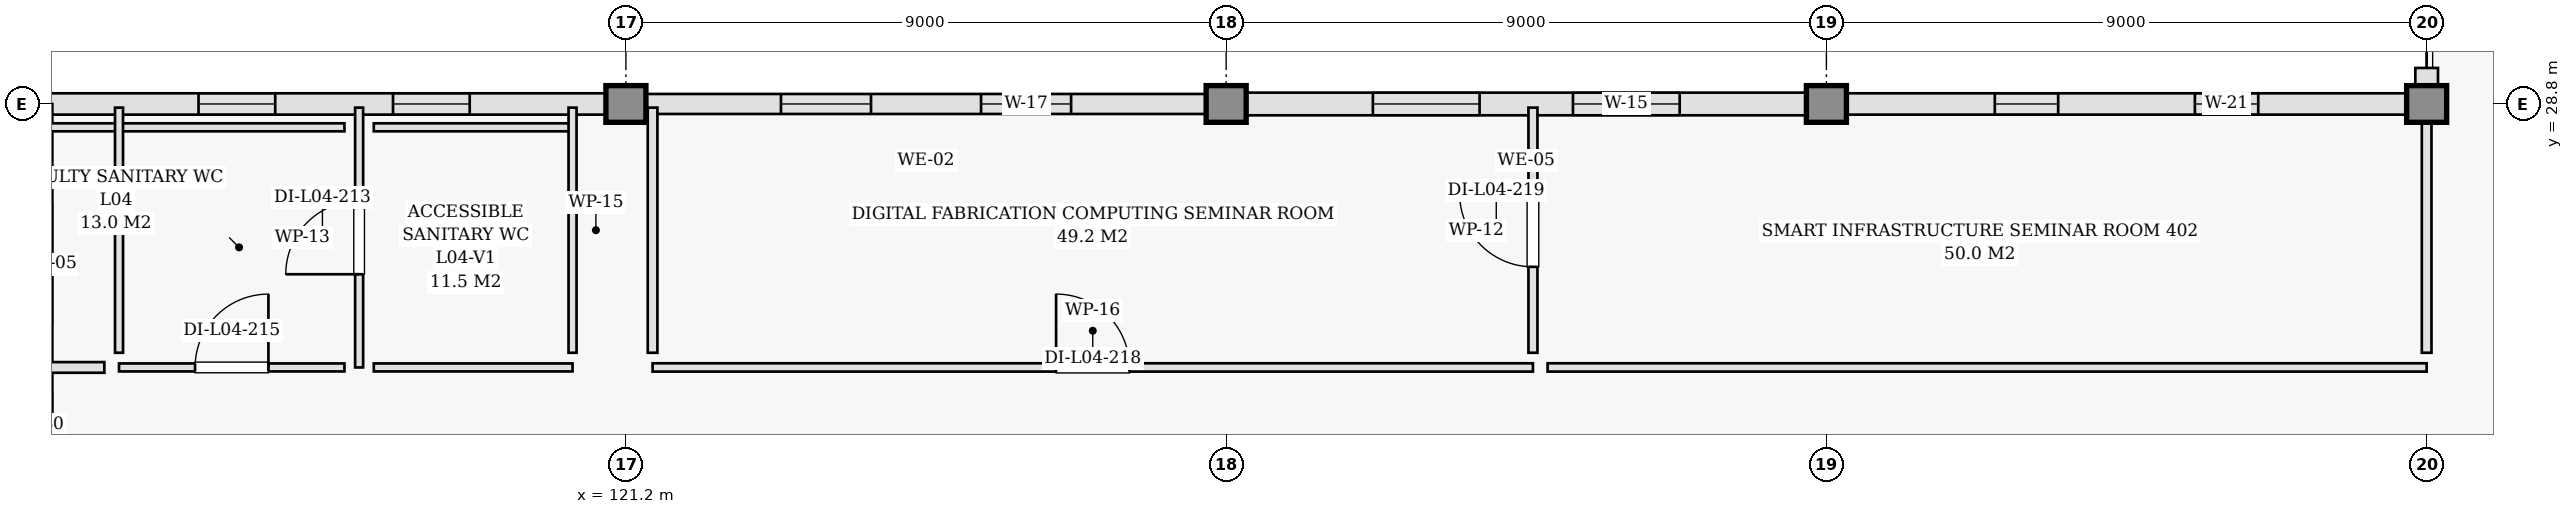
"""IFC4 building model, lengths in metres.
Left out: names, types, materials, properties, quantities, classifications, styles, units other than length and angle.
Written with IfcOpenShell. Run it as: python <this file> out.ifc"""

import sys

from ifc_helpers import new_model, si_unit, direction, frame, frame_2d, origin, origin_2d, place, context, subcontext, project, spatial, rectangle, extrude, element, fill, save


model = new_model("IFC4")
c1 = context("Model", 3, precision=1e-05, world=origin(), true_north=direction((0.0, 1.0)))
c2 = subcontext(c1, "Body", "Model", "MODEL_VIEW")
j1 = project(units=[si_unit("LENGTHUNIT", "METRE"), si_unit("PLANEANGLEUNIT", "RADIAN")], contexts=[c1])
p1 = place(None, origin())
s1 = spatial("IfcSite", under=j1, at=p1, CompositionType="ELEMENT")
p2 = place(p1, origin())
s2 = spatial("IfcBuilding", under=s1, at=p2, CompositionType="ELEMENT")
p3 = place(p2, frame((0.0, 0.0, 18.0)))
s3 = spatial("IfcBuildingStorey", under=s2, at=p3, CompositionType="ELEMENT", Elevation=18.0)
for number, where, z_axis, x_axis in (
    (1, (121.2, 28.8, 0.0), (0.0, 0.0, 1.0), (1.0, 0.0, 0.0)),
    (2, (130.2, 28.8, 0.0), (0.0, 0.0, 1.0), (1.0, 0.0, 0.0)),
    (3, (139.2, 28.8, 0.0), (0.0, 0.0, 1.0), (1.0, 0.0, 0.0)),
    (4, (148.2, 28.8, 0.0), (0.0, 0.0, 1.0), (1.0, 0.0, 0.0)),
):
    element("IfcColumn", number, at=place(p3, frame(where, z_axis=z_axis, x_axis=x_axis)), inside=s3, PredefinedType="COLUMN", context=c2, shape_type="SweptSolid", body=[
        extrude(rectangle(XDim=0.55, YDim=0.55, at=origin_2d()), origin(), (0.0, 0.0, 1.0), 4.2),
    ])
p4 = place(p3, frame((148.2, 29.34, 0.0), z_axis=(0.0, 0.0, 1.0), x_axis=(0.0, -1.0, 0.0)))
e5 = element("IfcWall", 5, at=p4, inside=s3, PredefinedType="SOLIDWALL", context=c2, shape_type="SweptSolid", body=[
    extrude(rectangle(XDim=0.378, YDim=0.34, at=frame_2d((0.189, 0.0))), origin(), (0.0, 0.0, 1.0), 3.125),
])
p5 = place(p3, frame((148.2, 28.8, 0.0), z_axis=(0.0, 0.0, 1.0), x_axis=(-1.0, 0.0, 0.0)))
e6 = element("IfcWall", 6, at=p5, inside=s3, PredefinedType="SOLIDWALL", context=c2, shape_type="SweptSolid", body=[
    extrude(rectangle(XDim=9.0, YDim=0.32, at=frame_2d((4.5, 0.0))), origin(), (0.0, 0.0, 1.0), 3.125),
])
p6 = place(p5, frame((2.525, 0.0, 0.9)))
e7 = element("IfcOpeningElement", 7, at=p6, cuts=e6, PredefinedType="OPENING", context=c2, shape_type="SweptSolid", body=[
    extrude(rectangle(XDim=0.95, YDim=1.35, at=frame_2d((0.475, 0.675))), frame((0.0, 0.17, 0.0), z_axis=(0.0, -1.0, 0.0), x_axis=(1.0, 0.0, 0.0)), (0.0, 0.0, 1.0), 0.34),
])
p7 = place(p5, frame((5.525, 0.0, 0.9)))
e8 = element("IfcOpeningElement", 8, at=p7, cuts=e6, PredefinedType="OPENING", context=c2, shape_type="SweptSolid", body=[
    extrude(rectangle(XDim=0.95, YDim=1.35, at=frame_2d((0.475, 0.675))), frame((0.0, 0.17, 0.0), z_axis=(0.0, -1.0, 0.0), x_axis=(1.0, 0.0, 0.0)), (0.0, 0.0, 1.0), 0.34),
])
p8 = place(p3, frame((139.2, 28.8, 0.0), z_axis=(0.0, 0.0, 1.0), x_axis=(-1.0, 0.0, 0.0)))
e9 = element("IfcWall", 9, at=p8, inside=s3, PredefinedType="SOLIDWALL", context=c2, shape_type="SweptSolid", body=[
    extrude(rectangle(XDim=9.0, YDim=0.34, at=frame_2d((4.5, 0.0))), origin(), (0.0, 0.0, 1.0), 3.125),
])
p9 = place(p8, frame((2.2, 0.0, 0.9)))
e10 = element("IfcOpeningElement", 10, at=p9, cuts=e9, PredefinedType="OPENING", context=c2, shape_type="SweptSolid", body=[
    extrude(rectangle(XDim=1.6, YDim=1.6, at=frame_2d((0.8, 0.8))), frame((0.0, 0.18, 0.0), z_axis=(0.0, -1.0, 0.0), x_axis=(1.0, 0.0, 0.0)), (0.0, 0.0, 1.0), 0.36),
])
p10 = place(p8, frame((5.2, 0.0, 0.9)))
e11 = element("IfcOpeningElement", 11, at=p10, cuts=e9, PredefinedType="OPENING", context=c2, shape_type="SweptSolid", body=[
    extrude(rectangle(XDim=1.6, YDim=1.6, at=frame_2d((0.8, 0.8))), frame((0.0, 0.18, 0.0), z_axis=(0.0, -1.0, 0.0), x_axis=(1.0, 0.0, 0.0)), (0.0, 0.0, 1.0), 0.36),
])
p11 = place(p3, frame((130.2, 28.8, 0.0), z_axis=(0.0, 0.0, 1.0), x_axis=(-1.0, 0.0, 0.0)))
e12 = element("IfcWall", 12, at=p11, inside=s3, PredefinedType="SOLIDWALL", context=c2, shape_type="SweptSolid", body=[
    extrude(rectangle(XDim=9.0, YDim=0.3, at=frame_2d((4.5, 0.0))), origin(), (0.0, 0.0, 1.0), 3.125),
])
p12 = place(p11, frame((2.325, 0.0, 0.9)))
e13 = element("IfcOpeningElement", 13, at=p12, cuts=e12, PredefinedType="OPENING", context=c2, shape_type="SweptSolid", body=[
    extrude(rectangle(XDim=1.35, YDim=1.55, at=frame_2d((0.675, 0.775))), frame((0.0, 0.16, 0.0), z_axis=(0.0, -1.0, 0.0), x_axis=(1.0, 0.0, 0.0)), (0.0, 0.0, 1.0), 0.32),
])
p13 = place(p11, frame((5.325, 0.0, 0.9)))
e14 = element("IfcOpeningElement", 14, at=p13, cuts=e12, PredefinedType="OPENING", context=c2, shape_type="SweptSolid", body=[
    extrude(rectangle(XDim=1.35, YDim=1.55, at=frame_2d((0.675, 0.775))), frame((0.0, 0.16, 0.0), z_axis=(0.0, -1.0, 0.0), x_axis=(1.0, 0.0, 0.0)), (0.0, 0.0, 1.0), 0.32),
])
p14 = place(p3, frame((121.2, 28.8, 0.0), z_axis=(0.0, 0.0, 1.0), x_axis=(-1.0, 0.0, 0.0)))
e15 = element("IfcWall", 15, at=p14, inside=s3, PredefinedType="SOLIDWALL", context=c2, shape_type="SweptSolid", body=[
    extrude(rectangle(XDim=8.75, YDim=0.32, at=frame_2d((4.375, 0.0))), origin(), (0.0, 0.0, 1.0), 3.125),
])
p15 = place(p14, frame((2.342, 0.0, 0.9)))
e16 = element("IfcOpeningElement", 16, at=p15, cuts=e15, PredefinedType="OPENING", context=c2, shape_type="SweptSolid", body=[
    extrude(rectangle(XDim=1.15, YDim=1.45, at=frame_2d((0.575, 0.725))), frame((0.0, 0.17, 0.0), z_axis=(0.0, -1.0, 0.0), x_axis=(1.0, 0.0, 0.0)), (0.0, 0.0, 1.0), 0.34),
])
p16 = place(p14, frame((5.258, 0.0, 0.9)))
e17 = element("IfcOpeningElement", 17, at=p16, cuts=e15, PredefinedType="OPENING", context=c2, shape_type="SweptSolid", body=[
    extrude(rectangle(XDim=1.15, YDim=1.45, at=frame_2d((0.575, 0.725))), frame((0.0, 0.17, 0.0), z_axis=(0.0, -1.0, 0.0), x_axis=(1.0, 0.0, 0.0)), (0.0, 0.0, 1.0), 0.34),
])
p17 = place(p3, frame((117.2, 24.85, 0.0), z_axis=(0.0, 0.0, 1.0), x_axis=(0.0, 1.0, 0.0)))
e18 = element("IfcWall", 18, at=p17, inside=s3, PredefinedType="PARTITIONING", context=c2, shape_type="SweptSolid", body=[
    extrude(rectangle(XDim=3.895, YDim=0.12, at=frame_2d((1.948, 0.0))), origin(), (0.0, 0.0, 1.0), 3.125),
])
p18 = place(p17, frame((1.397, 0.0, 0.0)))
e19 = element("IfcOpeningElement", 19, at=p18, cuts=e18, PredefinedType="OPENING", context=c2, shape_type="SweptSolid", body=[
    extrude(rectangle(XDim=1.1, YDim=2.15, at=frame_2d((0.55, 1.075))), frame((0.0, 0.07, 0.0), z_axis=(0.0, -1.0, 0.0), x_axis=(1.0, 0.0, 0.0)), (0.0, 0.0, 1.0), 0.14),
])
for number, where, z_axis, x_axis in (
    (20, (117.42, 24.85, 0.0), (0.0, 0.0, 1.0), (1.0, 0.0, 0.0)),
    (21, (117.42, 28.45, 0.0), (0.0, 0.0, 1.0), (1.0, 0.0, 0.0)),
):
    element("IfcWall", number, at=place(p3, frame(where, z_axis=z_axis, x_axis=x_axis)), inside=s3, PredefinedType="PARTITIONING", context=c2, shape_type="SweptSolid", body=[
        extrude(rectangle(XDim=2.98, YDim=0.12, at=frame_2d((1.49, 0.0))), origin(), (0.0, 0.0, 1.0), 3.94),
    ])
p19 = place(p3, frame((120.4, 25.07, 0.0), z_axis=(0.0, 0.0, 1.0), x_axis=(0.0, 1.0, 0.0)))
e22 = element("IfcWall", 22, at=p19, inside=s3, PredefinedType="PARTITIONING", context=c2, shape_type="SweptSolid", body=[
    extrude(rectangle(XDim=3.675, YDim=0.12, at=frame_2d((1.837, 0.0))), origin(), (0.0, 0.0, 1.0), 3.125),
])
p20 = place(p3, frame((112.505, 28.45, 0.0), z_axis=(0.0, 0.0, 1.0), x_axis=(1.0, 0.0, 0.0)))
e23 = element("IfcWall", 23, at=p20, inside=s3, PredefinedType="PARTITIONING", context=c2, shape_type="SweptSolid", body=[
    extrude(rectangle(XDim=4.475, YDim=0.12, at=frame_2d((2.238, 0.0))), origin(), (0.0, 0.0, 1.0), 3.94),
])
p21 = place(p3, frame((113.6, 24.85, 0.0), z_axis=(0.0, 0.0, 1.0), x_axis=(1.0, 0.0, 0.0)))
e24 = element("IfcWall", 24, at=p21, inside=s3, PredefinedType="PARTITIONING", context=c2, shape_type="SweptSolid", body=[
    extrude(rectangle(XDim=3.38, YDim=0.12, at=frame_2d((1.69, 0.0))), origin(), (0.0, 0.0, 1.0), 3.94),
])
p22 = place(p21, frame((1.14, 0.0, 0.0)))
e25 = element("IfcOpeningElement", 25, at=p22, cuts=e24, PredefinedType="OPENING", context=c2, shape_type="SweptSolid", body=[
    extrude(rectangle(XDim=1.1, YDim=2.15, at=frame_2d((0.55, 1.075))), frame((0.0, 0.07, 0.0), z_axis=(0.0, -1.0, 0.0), x_axis=(1.0, 0.0, 0.0)), (0.0, 0.0, 1.0), 0.14),
])
p23 = place(p3, frame((113.6, 25.07, 0.0), z_axis=(0.0, 0.0, 1.0), x_axis=(0.0, 1.0, 0.0)))
e26 = element("IfcWall", 26, at=p23, inside=s3, PredefinedType="PARTITIONING", context=c2, shape_type="SweptSolid", body=[
    extrude(rectangle(XDim=3.675, YDim=0.12, at=frame_2d((1.837, 0.0))), origin(), (0.0, 0.0, 1.0), 3.125),
])
p24 = place(p3, frame((121.6, 24.85, 0.0), z_axis=(0.0, 0.0, 1.0), x_axis=(1.0, 0.0, 0.0)))
e27 = element("IfcWall", 27, at=p24, inside=s3, PredefinedType="PARTITIONING", context=c2, shape_type="SweptSolid", body=[
    extrude(rectangle(XDim=13.2, YDim=0.125, at=frame_2d((6.6, 0.0))), origin(), (0.0, 0.0, 1.0), 3.94),
])
p25 = place(p24, frame((6.05, 0.0, 0.0)))
e28 = element("IfcOpeningElement", 28, at=p25, cuts=e27, PredefinedType="OPENING", context=c2, shape_type="SweptSolid", body=[
    extrude(rectangle(XDim=1.1, YDim=2.15, at=frame_2d((0.55, 1.075))), frame((0.0, 0.073, 0.0), z_axis=(0.0, -1.0, 0.0), x_axis=(1.0, 0.0, 0.0)), (0.0, 0.0, 1.0), 0.145),
])
p26 = place(p3, frame((121.6, 25.07, 0.0), z_axis=(0.0, 0.0, 1.0), x_axis=(0.0, 1.0, 0.0)))
e29 = element("IfcWall", 29, at=p26, inside=s3, PredefinedType="PARTITIONING", context=c2, shape_type="SweptSolid", body=[
    extrude(rectangle(XDim=3.675, YDim=0.145, at=frame_2d((1.837, 0.0))), origin(), (0.0, 0.0, 1.0), 3.125),
])
p27 = place(p3, frame((134.8, 25.07, 0.0), z_axis=(0.0, 0.0, 1.0), x_axis=(0.0, 1.0, 0.0)))
e30 = element("IfcWall", 30, at=p27, inside=s3, PredefinedType="PARTITIONING", context=c2, shape_type="SweptSolid", body=[
    extrude(rectangle(XDim=3.675, YDim=0.135, at=frame_2d((1.837, 0.0))), origin(), (0.0, 0.0, 1.0), 3.125),
])
p28 = place(p27, frame((1.288, 0.0, 0.0)))
e31 = element("IfcOpeningElement", 31, at=p28, cuts=e30, PredefinedType="OPENING", context=c2, shape_type="SweptSolid", body=[
    extrude(rectangle(XDim=1.1, YDim=2.15, at=frame_2d((0.55, 1.075))), frame((0.0, 0.078, 0.0), z_axis=(0.0, -1.0, 0.0), x_axis=(1.0, 0.0, 0.0)), (0.0, 0.0, 1.0), 0.155),
])
p29 = place(p3, frame((135.02, 24.85, 0.0), z_axis=(0.0, 0.0, 1.0), x_axis=(1.0, 0.0, 0.0)))
e32 = element("IfcWall", 32, at=p29, inside=s3, PredefinedType="PARTITIONING", context=c2, shape_type="SweptSolid", body=[
    extrude(rectangle(XDim=13.18, YDim=0.125, at=frame_2d((6.59, 0.0))), origin(), (0.0, 0.0, 1.0), 3.275),
])
p30 = place(p3, frame((148.2, 25.07, 0.0), z_axis=(0.0, 0.0, 1.0), x_axis=(0.0, 1.0, 0.0)))
e33 = element("IfcWall", 33, at=p30, inside=s3, PredefinedType="PARTITIONING", context=c2, shape_type="SweptSolid", body=[
    extrude(rectangle(XDim=3.49, YDim=0.145, at=frame_2d((1.745, 0.0))), origin(), (0.0, 0.0, 1.0), 3.275),
])
p31 = place(p3, frame((112.505, 24.85, 0.0), z_axis=(0.0, 0.0, 1.0), x_axis=(1.0, 0.0, 0.0)))
e34 = element("IfcWall", 34, at=p31, inside=s3, PredefinedType="PARTITIONING", context=c2, shape_type="SweptSolid", body=[
    extrude(rectangle(XDim=0.875, YDim=0.16, at=frame_2d((0.438, 0.0))), origin(), (0.0, 0.0, 1.0), 3.94),
])
p32 = place(p6, origin())
e35 = element("IfcWindow", 35, at=p32, inside=s3, PartitioningType="DOUBLE_PANEL_VERTICAL", PredefinedType="WINDOW", context=c2, shape_type="SweptSolid", body=[
    extrude(rectangle(XDim=0.95, YDim=1.35, at=frame_2d((0.475, 0.675))), frame((0.0, 0.03, 0.0), z_axis=(0.0, -1.0, 0.0), x_axis=(1.0, 0.0, 0.0)), (0.0, 0.0, 1.0), 0.06),
])
fill(e7, e35)
p33 = place(p7, origin())
e36 = element("IfcWindow", 36, at=p33, inside=s3, PartitioningType="DOUBLE_PANEL_VERTICAL", PredefinedType="WINDOW", context=c2, shape_type="SweptSolid", body=[
    extrude(rectangle(XDim=0.95, YDim=1.35, at=frame_2d((0.475, 0.675))), frame((0.0, 0.03, 0.0), z_axis=(0.0, -1.0, 0.0), x_axis=(1.0, 0.0, 0.0)), (0.0, 0.0, 1.0), 0.06),
])
fill(e8, e36)
p34 = place(p9, origin())
e37 = element("IfcWindow", 37, at=p34, inside=s3, PartitioningType="DOUBLE_PANEL_VERTICAL", PredefinedType="WINDOW", context=c2, shape_type="SweptSolid", body=[
    extrude(rectangle(XDim=1.6, YDim=1.6, at=frame_2d((0.8, 0.8))), frame((0.0, 0.03, 0.0), z_axis=(0.0, -1.0, 0.0), x_axis=(1.0, 0.0, 0.0)), (0.0, 0.0, 1.0), 0.06),
])
fill(e10, e37)
p35 = place(p10, origin())
e38 = element("IfcWindow", 38, at=p35, inside=s3, PartitioningType="DOUBLE_PANEL_VERTICAL", PredefinedType="WINDOW", context=c2, shape_type="SweptSolid", body=[
    extrude(rectangle(XDim=1.6, YDim=1.6, at=frame_2d((0.8, 0.8))), frame((0.0, 0.03, 0.0), z_axis=(0.0, -1.0, 0.0), x_axis=(1.0, 0.0, 0.0)), (0.0, 0.0, 1.0), 0.06),
])
fill(e11, e38)
p36 = place(p12, origin())
e39 = element("IfcWindow", 39, at=p36, inside=s3, PartitioningType="DOUBLE_PANEL_VERTICAL", PredefinedType="WINDOW", context=c2, shape_type="SweptSolid", body=[
    extrude(rectangle(XDim=1.35, YDim=1.55, at=frame_2d((0.675, 0.775))), frame((0.0, 0.03, 0.0), z_axis=(0.0, -1.0, 0.0), x_axis=(1.0, 0.0, 0.0)), (0.0, 0.0, 1.0), 0.06),
])
fill(e13, e39)
p37 = place(p13, origin())
e40 = element("IfcWindow", 40, at=p37, inside=s3, PartitioningType="DOUBLE_PANEL_VERTICAL", PredefinedType="WINDOW", context=c2, shape_type="SweptSolid", body=[
    extrude(rectangle(XDim=1.35, YDim=1.55, at=frame_2d((0.675, 0.775))), frame((0.0, 0.03, 0.0), z_axis=(0.0, -1.0, 0.0), x_axis=(1.0, 0.0, 0.0)), (0.0, 0.0, 1.0), 0.06),
])
fill(e14, e40)
p38 = place(p15, origin())
e41 = element("IfcWindow", 41, at=p38, inside=s3, PartitioningType="DOUBLE_PANEL_VERTICAL", PredefinedType="WINDOW", context=c2, shape_type="SweptSolid", body=[
    extrude(rectangle(XDim=1.15, YDim=1.45, at=frame_2d((0.575, 0.725))), frame((0.0, 0.03, 0.0), z_axis=(0.0, -1.0, 0.0), x_axis=(1.0, 0.0, 0.0)), (0.0, 0.0, 1.0), 0.06),
])
fill(e16, e41)
p39 = place(p16, origin())
e42 = element("IfcWindow", 42, at=p39, inside=s3, PartitioningType="DOUBLE_PANEL_VERTICAL", PredefinedType="WINDOW", context=c2, shape_type="SweptSolid", body=[
    extrude(rectangle(XDim=1.15, YDim=1.45, at=frame_2d((0.575, 0.725))), frame((0.0, 0.03, 0.0), z_axis=(0.0, -1.0, 0.0), x_axis=(1.0, 0.0, 0.0)), (0.0, 0.0, 1.0), 0.06),
])
fill(e17, e42)
p40 = place(p18, origin())
e43 = element("IfcDoor", 43, at=p40, inside=s3, OperationType="SINGLE_SWING_LEFT", PredefinedType="DOOR", context=c2, shape_type="SweptSolid", body=[
    extrude(rectangle(XDim=1.1, YDim=2.15, at=frame_2d((0.55, 1.075))), frame((0.0, 0.025, 0.0), z_axis=(0.0, -1.0, 0.0), x_axis=(1.0, 0.0, 0.0)), (0.0, 0.0, 1.0), 0.05),
])
fill(e19, e43)
p41 = place(p22, origin())
e44 = element("IfcDoor", 44, at=p41, inside=s3, OperationType="SINGLE_SWING_RIGHT", PredefinedType="DOOR", context=c2, shape_type="SweptSolid", body=[
    extrude(rectangle(XDim=1.1, YDim=2.15, at=frame_2d((0.55, 1.075))), frame((0.0, 0.025, 0.0), z_axis=(0.0, -1.0, 0.0), x_axis=(1.0, 0.0, 0.0)), (0.0, 0.0, 1.0), 0.05),
])
fill(e25, e44)
p42 = place(p25, origin())
e45 = element("IfcDoor", 45, at=p42, inside=s3, OperationType="SINGLE_SWING_LEFT", PredefinedType="DOOR", context=c2, shape_type="SweptSolid", body=[
    extrude(rectangle(XDim=1.1, YDim=2.15, at=frame_2d((0.55, 1.075))), frame((0.0, 0.025, 0.0), z_axis=(0.0, -1.0, 0.0), x_axis=(1.0, 0.0, 0.0)), (0.0, 0.0, 1.0), 0.05),
])
fill(e28, e45)
p43 = place(p28, origin())
e46 = element("IfcDoor", 46, at=p43, inside=s3, OperationType="SINGLE_SWING_RIGHT", PredefinedType="DOOR", context=c2, shape_type="SweptSolid", body=[
    extrude(rectangle(XDim=1.1, YDim=2.15, at=frame_2d((0.55, 1.075))), frame((0.0, 0.025, 0.0), z_axis=(0.0, -1.0, 0.0), x_axis=(1.0, 0.0, 0.0)), (0.0, 0.0, 1.0), 0.05),
])
fill(e31, e46)
save(model, sys.argv[1])
